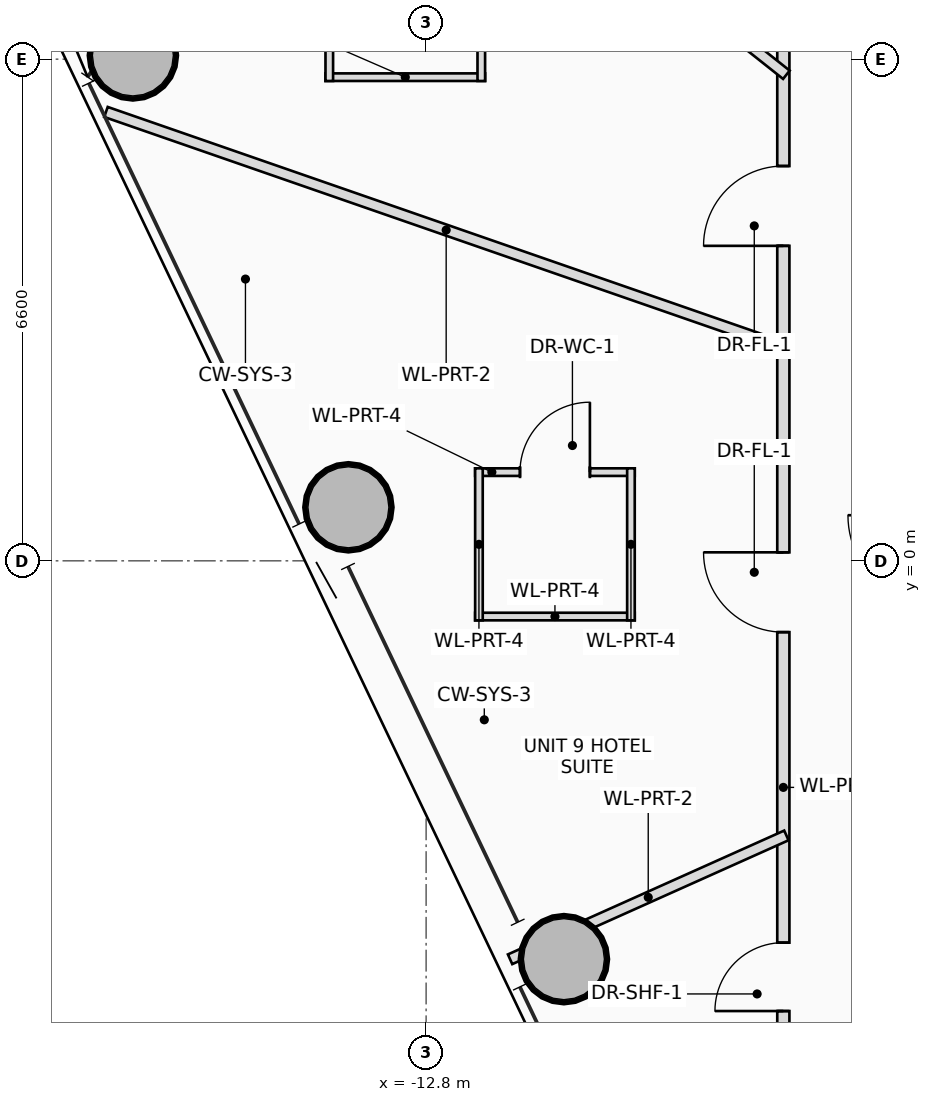
"""IFC4 building model, lengths in metres.
Left out: names, types, materials, properties, quantities, classifications, styles, units other than length and angle.
Written with IfcOpenShell. Run it as: python <this file> out.ifc"""

import sys

from ifc_helpers import new_model, si_unit, direction, frame, frame_2d, origin, origin_2d, place, context, subcontext, project, spatial, rectangle, hollow_circle, extrude, source, transform, mapped, element, fill, save


model = new_model("IFC4")
c1 = context("Model", 3, precision=1e-05, world=origin(), true_north=direction((0.0, 1.0)))
c2 = subcontext(c1, "Body", "Model", "MODEL_VIEW")
j1 = project(units=[si_unit("LENGTHUNIT", "METRE"), si_unit("PLANEANGLEUNIT", "RADIAN")], contexts=[c1])
p1 = place(None, origin())
s1 = spatial("IfcSite", under=j1, at=p1, CompositionType="ELEMENT")
p2 = place(p1, origin())
s2 = spatial("IfcBuilding", under=s1, at=p2, CompositionType="ELEMENT")
p3 = place(p2, frame((0.0, 0.0, 208.7)))
s3 = spatial("IfcBuildingStorey", under=s2, at=p3, CompositionType="ELEMENT", Elevation=208.7)
m1 = source(origin(), c2, "Body", "SweptSolid", [
    extrude(hollow_circle(Radius=0.575, WallThickness=0.042, at=origin_2d()), origin(), (0.0, 0.0, 1.0), 3.45),
])
for number, where, z_axis, x_axis in (
    (1, (-16.658, 6.649, 0.0), (0.0, 0.0, 1.0), (1.0, 0.0, 0.0)),
    (2, (-13.823, 0.704, 0.0), (0.0, 0.0, 1.0), (1.0, 0.0, 0.0)),
    (3, (-10.987, -5.24, 0.0), (0.0, 0.0, 1.0), (1.0, 0.0, 0.0)),
):
    element("IfcColumn", number, at=place(p3, frame(where, z_axis=z_axis, x_axis=x_axis)), inside=s3, PredefinedType="COLUMN", context=c2, shape_type="MappedRepresentation", body=[
        mapped(m1, transform((0.0, 0.0, 0.0), scale=1.0)),
    ])
p4 = place(p3, frame((-12.024, 6.363, 0.0), z_axis=(0.0, 0.0, 1.0), x_axis=(-1.0, 0.0, 0.0)))
e4 = element("IfcWall", 4, at=p4, inside=s3, PredefinedType="PARTITIONING", context=c2, shape_type="SweptSolid", body=[
    extrude(rectangle(XDim=2.1, YDim=0.1, at=frame_2d((1.05, 0.0))), origin(), (0.0, 0.0, 1.0), 2.605),
])
p5 = place(p3, frame((-12.074, 8.313, 0.0), z_axis=(0.0, 0.0, 1.0), x_axis=(0.0, -1.0, 0.0)))
e5 = element("IfcWall", 5, at=p5, inside=s3, PredefinedType="PARTITIONING", context=c2, shape_type="SweptSolid", body=[
    extrude(rectangle(XDim=2.0, YDim=0.1, at=frame_2d((1.0, 0.0))), origin(), (0.0, 0.0, 1.0), 2.905),
])
p6 = place(p3, frame((-14.074, 6.313, 0.0), z_axis=(0.0, 0.0, 1.0), x_axis=(0.0, 1.0, 0.0)))
e6 = element("IfcWall", 6, at=p6, inside=s3, PredefinedType="PARTITIONING", context=c2, shape_type="SweptSolid", body=[
    extrude(rectangle(XDim=2.0, YDim=0.1, at=frame_2d((1.0, 0.0))), origin(), (0.0, 0.0, 1.0), 2.605),
])
p7 = place(p3, frame((-12.155, 1.167, 0.0), z_axis=(0.0, 0.0, 1.0), x_axis=(1.0, 0.0, 0.0)))
e7 = element("IfcWall", 7, at=p7, inside=s3, PredefinedType="PARTITIONING", context=c2, shape_type="SweptSolid", body=[
    extrude(rectangle(XDim=2.1, YDim=0.1, at=frame_2d((1.05, 0.0))), origin(), (0.0, 0.0, 1.0), 2.905),
])
p8 = place(p7, frame((0.59, 0.0, 0.0)))
e8 = element("IfcOpeningElement", 8, at=p8, cuts=e7, PredefinedType="OPENING", context=c2, shape_type="SweptSolid", body=[
    extrude(rectangle(XDim=0.92, YDim=2.1, at=frame_2d((0.46, 1.05))), frame((0.0, 0.06, 0.0), z_axis=(0.0, -1.0, 0.0), x_axis=(1.0, 0.0, 0.0)), (0.0, 0.0, 1.0), 0.12),
])
p9 = place(p3, frame((-10.055, -0.733, 0.0), z_axis=(0.0, 0.0, 1.0), x_axis=(-1.0, 0.0, 0.0)))
e9 = element("IfcWall", 9, at=p9, inside=s3, PredefinedType="PARTITIONING", context=c2, shape_type="SweptSolid", body=[
    extrude(rectangle(XDim=2.1, YDim=0.1, at=frame_2d((1.05, 0.0))), origin(), (0.0, 0.0, 1.0), 2.905),
])
for number, where, z_axis, x_axis in (
    (10, (-10.105, 1.217, 0.0), (0.0, 0.0, 1.0), (0.0, -1.0, 0.0)),
    (11, (-12.105, -0.783, 0.0), (0.0, 0.0, 1.0), (0.0, 1.0, 0.0)),
):
    element("IfcWall", number, at=place(p3, frame(where, z_axis=z_axis, x_axis=x_axis)), inside=s3, PredefinedType="PARTITIONING", context=c2, shape_type="SweptSolid", body=[
        extrude(rectangle(XDim=2.0, YDim=0.1, at=frame_2d((1.0, 0.0))), origin(), (0.0, 0.0, 1.0), 3.25),
    ])
p10 = place(p3, frame((-8.1, -7.46, 0.0), z_axis=(0.0, 0.0, 1.0), x_axis=(0.0, 1.0, 0.0)))
e12 = element("IfcWall", 12, at=p10, inside=s3, PredefinedType="PARTITIONING", context=c2, shape_type="SweptSolid", body=[
    extrude(rectangle(XDim=15.01, YDim=0.16, at=frame_2d((7.505, 0.0))), origin(), (0.0, 0.0, 1.0), 2.605),
])
p11 = place(p10, frame((1.537, 0.0, 0.0)))
e13 = element("IfcOpeningElement", 13, at=p11, cuts=e12, PredefinedType="OPENING", context=c2, shape_type="SweptSolid", body=[
    extrude(rectangle(XDim=0.9, YDim=2.05, at=frame_2d((0.45, 1.025))), frame((0.0, 0.09, 0.0), z_axis=(0.0, -1.0, 0.0), x_axis=(1.0, 0.0, 0.0)), (0.0, 0.0, 1.0), 0.18),
])
p12 = place(p10, frame((6.522, 0.0, 0.0)))
e14 = element("IfcOpeningElement", 14, at=p12, cuts=e12, PredefinedType="OPENING", context=c2, shape_type="SweptSolid", body=[
    extrude(rectangle(XDim=1.05, YDim=2.2, at=frame_2d((0.525, 1.1))), frame((0.0, 0.09, 0.0), z_axis=(0.0, -1.0, 0.0), x_axis=(1.0, 0.0, 0.0)), (0.0, 0.0, 1.0), 0.18),
])
p13 = place(p10, frame((11.604, 0.0, 0.0)))
e15 = element("IfcOpeningElement", 15, at=p13, cuts=e12, PredefinedType="OPENING", context=c2, shape_type="SweptSolid", body=[
    extrude(rectangle(XDim=1.05, YDim=2.2, at=frame_2d((0.525, 1.1))), frame((0.0, 0.09, 0.0), z_axis=(0.0, -1.0, 0.0), x_axis=(1.0, 0.0, 0.0)), (0.0, 0.0, 1.0), 0.18),
])
p14 = place(p3, frame((-8.06, 6.395, 0.0), z_axis=(0.0, 0.0, 1.0), x_axis=(-0.783385602556, 0.621535998723, 0.0)))
e16 = element("IfcWall", 16, at=p14, inside=s3, PredefinedType="PARTITIONING", context=c2, shape_type="SweptSolid", body=[
    extrude(rectangle(XDim=8.449, YDim=0.14, at=frame_2d((4.224, 0.0))), origin(), (0.0, 0.0, 1.0), 2.605),
])
p15 = place(p3, frame((-8.06, 2.798, 0.0), z_axis=(0.0, 0.0, 1.0), x_axis=(-0.944705149401, 0.327920997643, 0.0)))
e17 = element("IfcWall", 17, at=p15, inside=s3, PredefinedType="PARTITIONING", context=c2, shape_type="SweptSolid", body=[
    extrude(rectangle(XDim=9.476, YDim=0.14, at=frame_2d((4.738, 0.0))), origin(), (0.0, 0.0, 1.0), 2.605),
])
p16 = place(p3, frame((-8.06, -3.613, 0.0), z_axis=(0.0, 0.0, 1.0), x_axis=(-0.91252825503, -0.409013671865, 0.0)))
e18 = element("IfcWall", 18, at=p16, inside=s3, PredefinedType="PARTITIONING", context=c2, shape_type="SweptSolid", body=[
    extrude(rectangle(XDim=3.984, YDim=0.14, at=frame_2d((1.992, 0.0))), origin(), (0.0, 0.0, 1.0), 2.805),
])
p17 = place(p8, origin())
e19 = element("IfcDoor", 19, at=p17, inside=s3, OperationType="SINGLE_SWING_RIGHT", PredefinedType="DOOR", context=c2, shape_type="SweptSolid", body=[
    extrude(rectangle(XDim=0.92, YDim=2.1, at=frame_2d((0.46, 1.05))), frame((0.0, 0.025, 0.0), z_axis=(0.0, -1.0, 0.0), x_axis=(1.0, 0.0, 0.0)), (0.0, 0.0, 1.0), 0.05),
])
fill(e8, e19)
p18 = place(p11, origin())
e20 = element("IfcDoor", 20, at=p18, inside=s3, OperationType="SINGLE_SWING_LEFT", PredefinedType="DOOR", context=c2, shape_type="SweptSolid", body=[
    extrude(rectangle(XDim=0.9, YDim=2.05, at=frame_2d((0.45, 1.025))), frame((0.0, 0.025, 0.0), z_axis=(0.0, -1.0, 0.0), x_axis=(1.0, 0.0, 0.0)), (0.0, 0.0, 1.0), 0.05),
])
fill(e13, e20)
p19 = place(p12, origin())
e21 = element("IfcDoor", 21, at=p19, inside=s3, OperationType="SINGLE_SWING_RIGHT", PredefinedType="DOOR", context=c2, shape_type="SweptSolid", body=[
    extrude(rectangle(XDim=1.05, YDim=2.2, at=frame_2d((0.525, 1.1))), frame((0.0, 0.025, 0.0), z_axis=(0.0, -1.0, 0.0), x_axis=(1.0, 0.0, 0.0)), (0.0, 0.0, 1.0), 0.05),
])
fill(e14, e21)
p20 = place(p13, origin())
e22 = element("IfcDoor", 22, at=p20, inside=s3, OperationType="SINGLE_SWING_LEFT", PredefinedType="DOOR", context=c2, shape_type="SweptSolid", body=[
    extrude(rectangle(XDim=1.05, YDim=2.2, at=frame_2d((0.525, 1.1))), frame((0.0, 0.025, 0.0), z_axis=(0.0, -1.0, 0.0), x_axis=(1.0, 0.0, 0.0)), (0.0, 0.0, 1.0), 0.05),
])
fill(e15, e22)
save(model, sys.argv[1])
